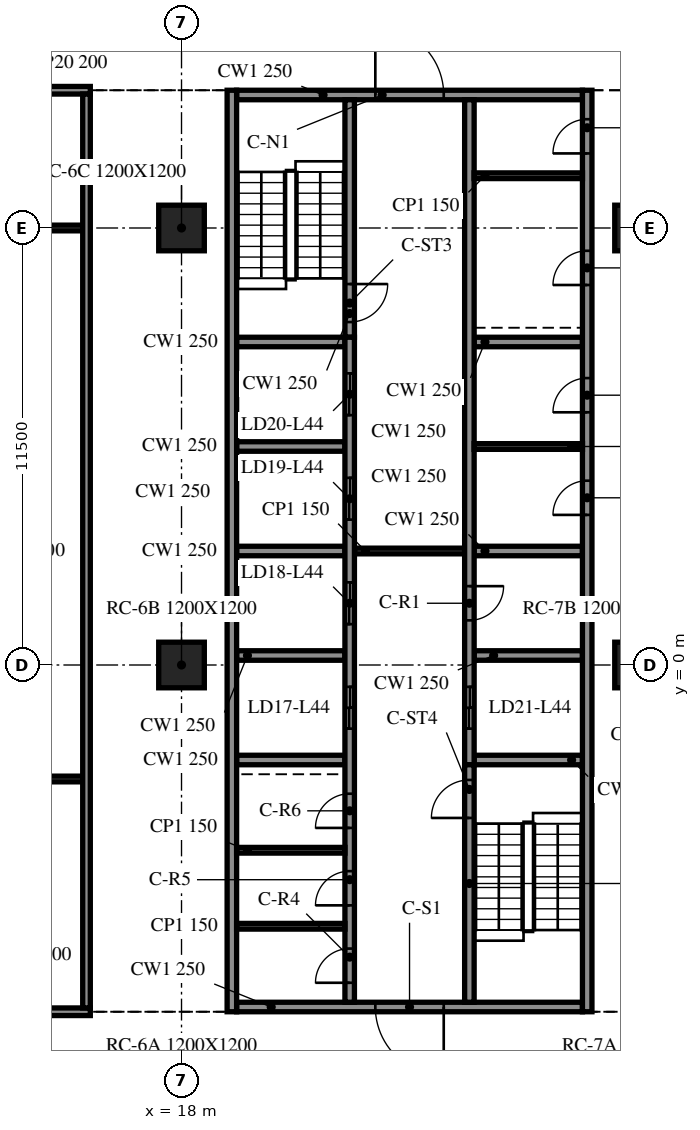
"""IFC4 building model, lengths in metres.
Left out: names, types, materials, properties, quantities, classifications, styles, units other than length and angle.
Written with IfcOpenShell. Run it as: python <this file> out.ifc"""

import sys

from ifc_helpers import new_model, si_unit, direction, frame, frame_2d, origin, origin_2d, place, context, subcontext, project, spatial, rectangle, extrude, element, fill, save


model = new_model("IFC4")
c1 = context("Model", 3, precision=1e-05, world=origin(), true_north=direction((0.0, 1.0)))
c2 = subcontext(c1, "Body", "Model", "MODEL_VIEW")
j1 = project(units=[si_unit("LENGTHUNIT", "METRE"), si_unit("PLANEANGLEUNIT", "RADIAN")], contexts=[c1])
p1 = place(None, origin())
s1 = spatial("IfcSite", under=j1, at=p1, CompositionType="ELEMENT")
p2 = place(p1, origin())
s2 = spatial("IfcBuilding", under=s1, at=p2, CompositionType="ELEMENT")
p3 = place(p2, frame((0.0, 0.0, 185.8)))
s3 = spatial("IfcBuildingStorey", under=s2, at=p3, CompositionType="ELEMENT", Elevation=185.8)
for number, where, z_axis, x_axis in (
    (1, (18.0, 0.0, -0.34), (0.0, 0.0, 1.0), (1.0, 0.0, 0.0)),
    (2, (18.0, 11.5, -0.34), (0.0, 0.0, 1.0), (1.0, 0.0, 0.0)),
    (3, (30.0, 0.0, -0.34), (0.0, 0.0, 1.0), (1.0, 0.0, 0.0)),
    (4, (30.0, 11.5, -0.34), (0.0, 0.0, 1.0), (1.0, 0.0, 0.0)),
):
    element("IfcColumn", number, at=place(p3, frame(where, z_axis=z_axis, x_axis=x_axis)), inside=s3, PredefinedType="COLUMN", context=c2, shape_type="SweptSolid", body=[
        extrude(rectangle(XDim=1.2, YDim=1.2, at=origin_2d()), origin(), (0.0, 0.0, 1.0), 3.74),
    ])
p4 = place(p3, frame((19.325, 15.125, 0.0), z_axis=(0.0, 0.0, 1.0), x_axis=(0.0, -1.0, 0.0)))
e5 = element("IfcWall", 5, at=p4, inside=s3, PredefinedType="SOLIDWALL", context=c2, shape_type="SweptSolid", body=[
    extrude(rectangle(XDim=24.25, YDim=0.25, at=frame_2d((12.125, 0.0))), origin(), (0.0, 0.0, 1.0), 3.4),
])
p5 = place(p3, frame((28.675, -9.125, 0.0), z_axis=(0.0, 0.0, 1.0), x_axis=(0.0, 1.0, 0.0)))
e6 = element("IfcWall", 6, at=p5, inside=s3, PredefinedType="SOLIDWALL", context=c2, shape_type="SweptSolid", body=[
    extrude(rectangle(XDim=24.25, YDim=0.25, at=frame_2d((12.125, 0.0))), origin(), (0.0, 0.0, 1.0), 3.4),
])
p6 = place(p5, frame((13.075, 0.0, 0.0)))
e7 = element("IfcOpeningElement", 7, at=p6, cuts=e6, PredefinedType="OPENING", context=c2, shape_type="SweptSolid", body=[
    extrude(rectangle(XDim=0.9, YDim=2.1, at=frame_2d((0.45, 1.05))), frame((0.0, 0.135, 0.0), z_axis=(0.0, -1.0, 0.0), x_axis=(1.0, 0.0, 0.0)), (0.0, 0.0, 1.0), 0.27),
])
p7 = place(p5, frame((15.775, 0.0, 0.0)))
e8 = element("IfcOpeningElement", 8, at=p7, cuts=e6, PredefinedType="OPENING", context=c2, shape_type="SweptSolid", body=[
    extrude(rectangle(XDim=0.9, YDim=2.1, at=frame_2d((0.45, 1.05))), frame((0.0, 0.135, 0.0), z_axis=(0.0, -1.0, 0.0), x_axis=(1.0, 0.0, 0.0)), (0.0, 0.0, 1.0), 0.27),
])
p8 = place(p5, frame((19.125, 0.0, 0.0)))
e9 = element("IfcOpeningElement", 9, at=p8, cuts=e6, PredefinedType="OPENING", context=c2, shape_type="SweptSolid", body=[
    extrude(rectangle(XDim=0.9, YDim=2.1, at=frame_2d((0.45, 1.05))), frame((0.0, 0.135, 0.0), z_axis=(0.0, -1.0, 0.0), x_axis=(1.0, 0.0, 0.0)), (0.0, 0.0, 1.0), 0.27),
])
p9 = place(p5, frame((22.587, 0.0, 0.0)))
e10 = element("IfcOpeningElement", 10, at=p9, cuts=e6, PredefinedType="OPENING", context=c2, shape_type="SweptSolid", body=[
    extrude(rectangle(XDim=0.9, YDim=2.1, at=frame_2d((0.45, 1.05))), frame((0.0, 0.135, 0.0), z_axis=(0.0, -1.0, 0.0), x_axis=(1.0, 0.0, 0.0)), (0.0, 0.0, 1.0), 0.27),
])
p10 = place(p3, frame((28.55, -9.0, 0.0), z_axis=(0.0, 0.0, 1.0), x_axis=(-1.0, 0.0, 0.0)))
e11 = element("IfcWall", 11, at=p10, inside=s3, PredefinedType="SOLIDWALL", context=c2, shape_type="SweptSolid", body=[
    extrude(rectangle(XDim=9.1, YDim=0.25, at=frame_2d((4.55, 0.0))), origin(), (0.0, 0.0, 1.0), 3.4),
])
p11 = place(p10, frame((3.65, 0.0, 0.0)))
e12 = element("IfcOpeningElement", 12, at=p11, cuts=e11, PredefinedType="OPENING", context=c2, shape_type="SweptSolid", body=[
    extrude(rectangle(XDim=1.8, YDim=2.1, at=frame_2d((0.9, 1.05))), frame((0.0, 0.135, 0.0), z_axis=(0.0, -1.0, 0.0), x_axis=(1.0, 0.0, 0.0)), (0.0, 0.0, 1.0), 0.27),
])
p12 = place(p3, frame((19.45, 15.0, 0.0), z_axis=(0.0, 0.0, 1.0), x_axis=(1.0, 0.0, 0.0)))
e13 = element("IfcWall", 13, at=p12, inside=s3, PredefinedType="SOLIDWALL", context=c2, shape_type="SweptSolid", body=[
    extrude(rectangle(XDim=9.1, YDim=0.25, at=frame_2d((4.55, 0.0))), origin(), (0.0, 0.0, 1.0), 3.4),
])
p13 = place(p12, frame((3.65, 0.0, 0.0)))
e14 = element("IfcOpeningElement", 14, at=p13, cuts=e13, PredefinedType="OPENING", context=c2, shape_type="SweptSolid", body=[
    extrude(rectangle(XDim=1.8, YDim=2.1, at=frame_2d((0.9, 1.05))), frame((0.0, 0.135, 0.0), z_axis=(0.0, -1.0, 0.0), x_axis=(1.0, 0.0, 0.0)), (0.0, 0.0, 1.0), 0.27),
])
p14 = place(p3, frame((22.425, -8.875, 0.0), z_axis=(0.0, 0.0, 1.0), x_axis=(0.0, 1.0, 0.0)))
e15 = element("IfcWall", 15, at=p14, inside=s3, PredefinedType="SOLIDWALL", context=c2, shape_type="SweptSolid", body=[
    extrude(rectangle(XDim=17.5, YDim=0.25, at=frame_2d((8.75, 0.0))), origin(), (0.0, 0.0, 1.0), 3.4),
])
p15 = place(p14, frame((7.2, 0.0, 0.0)))
e16 = element("IfcOpeningElement", 16, at=p15, cuts=e15, PredefinedType="OPENING", context=c2, shape_type="SweptSolid", body=[
    extrude(rectangle(XDim=1.1, YDim=2.1, at=frame_2d((0.55, 1.05))), frame((0.0, 0.135, 0.0), z_axis=(0.0, -1.0, 0.0), x_axis=(1.0, 0.0, 0.0)), (0.0, 0.0, 1.0), 0.27),
])
p16 = place(p14, frame((9.95, 0.0, 0.0)))
e17 = element("IfcOpeningElement", 17, at=p16, cuts=e15, PredefinedType="OPENING", context=c2, shape_type="SweptSolid", body=[
    extrude(rectangle(XDim=1.1, YDim=2.1, at=frame_2d((0.55, 1.05))), frame((0.0, 0.135, 0.0), z_axis=(0.0, -1.0, 0.0), x_axis=(1.0, 0.0, 0.0)), (0.0, 0.0, 1.0), 0.27),
])
p17 = place(p14, frame((12.7, 0.0, 0.0)))
e18 = element("IfcOpeningElement", 18, at=p17, cuts=e15, PredefinedType="OPENING", context=c2, shape_type="SweptSolid", body=[
    extrude(rectangle(XDim=1.1, YDim=2.1, at=frame_2d((0.55, 1.05))), frame((0.0, 0.135, 0.0), z_axis=(0.0, -1.0, 0.0), x_axis=(1.0, 0.0, 0.0)), (0.0, 0.0, 1.0), 0.27),
])
p18 = place(p14, frame((15.45, 0.0, 0.0)))
e19 = element("IfcOpeningElement", 19, at=p18, cuts=e15, PredefinedType="OPENING", context=c2, shape_type="SweptSolid", body=[
    extrude(rectangle(XDim=1.1, YDim=2.1, at=frame_2d((0.55, 1.05))), frame((0.0, 0.135, 0.0), z_axis=(0.0, -1.0, 0.0), x_axis=(1.0, 0.0, 0.0)), (0.0, 0.0, 1.0), 0.27),
])
p19 = place(p14, frame((0.512, 0.0, 0.0)))
e20 = element("IfcOpeningElement", 20, at=p19, cuts=e15, PredefinedType="OPENING", context=c2, shape_type="SweptSolid", body=[
    extrude(rectangle(XDim=0.9, YDim=2.1, at=frame_2d((0.45, 1.05))), frame((0.0, 0.135, 0.0), z_axis=(0.0, -1.0, 0.0), x_axis=(1.0, 0.0, 0.0)), (0.0, 0.0, 1.0), 0.27),
])
p20 = place(p14, frame((2.55, 0.0, 0.0)))
e21 = element("IfcOpeningElement", 21, at=p20, cuts=e15, PredefinedType="OPENING", context=c2, shape_type="SweptSolid", body=[
    extrude(rectangle(XDim=0.9, YDim=2.1, at=frame_2d((0.45, 1.05))), frame((0.0, 0.135, 0.0), z_axis=(0.0, -1.0, 0.0), x_axis=(1.0, 0.0, 0.0)), (0.0, 0.0, 1.0), 0.27),
])
p21 = place(p14, frame((4.587, 0.0, 0.0)))
e22 = element("IfcOpeningElement", 22, at=p21, cuts=e15, PredefinedType="OPENING", context=c2, shape_type="SweptSolid", body=[
    extrude(rectangle(XDim=0.9, YDim=2.1, at=frame_2d((0.45, 1.05))), frame((0.0, 0.135, 0.0), z_axis=(0.0, -1.0, 0.0), x_axis=(1.0, 0.0, 0.0)), (0.0, 0.0, 1.0), 0.27),
])
p22 = place(p3, frame((22.425, 14.875, 0.0), z_axis=(0.0, 0.0, 1.0), x_axis=(0.0, -1.0, 0.0)))
e23 = element("IfcWall", 23, at=p22, inside=s3, PredefinedType="SOLIDWALL", context=c2, shape_type="SweptSolid", body=[
    extrude(rectangle(XDim=6.25, YDim=0.25, at=frame_2d((3.125, 0.0))), origin(), (0.0, 0.0, 1.0), 3.4),
])
p23 = place(p22, frame((4.85, 0.0, 0.0)))
e24 = element("IfcOpeningElement", 24, at=p23, cuts=e23, PredefinedType="OPENING", context=c2, shape_type="SweptSolid", body=[
    extrude(rectangle(XDim=1.0, YDim=2.1, at=frame_2d((0.5, 1.05))), frame((0.0, 0.135, 0.0), z_axis=(0.0, -1.0, 0.0), x_axis=(1.0, 0.0, 0.0)), (0.0, 0.0, 1.0), 0.27),
])
p24 = place(p3, frame((25.575, -8.875, 0.0), z_axis=(0.0, 0.0, 1.0), x_axis=(0.0, 1.0, 0.0)))
e25 = element("IfcWall", 25, at=p24, inside=s3, PredefinedType="SOLIDWALL", context=c2, shape_type="SweptSolid", body=[
    extrude(rectangle(XDim=6.25, YDim=0.25, at=frame_2d((3.125, 0.0))), origin(), (0.0, 0.0, 1.0), 3.4),
])
p25 = place(p24, frame((4.85, 0.0, 0.0)))
e26 = element("IfcOpeningElement", 26, at=p25, cuts=e25, PredefinedType="OPENING", context=c2, shape_type="SweptSolid", body=[
    extrude(rectangle(XDim=1.0, YDim=2.1, at=frame_2d((0.5, 1.05))), frame((0.0, 0.135, 0.0), z_axis=(0.0, -1.0, 0.0), x_axis=(1.0, 0.0, 0.0)), (0.0, 0.0, 1.0), 0.27),
])
p26 = place(p3, frame((25.575, 14.875, 0.0), z_axis=(0.0, 0.0, 1.0), x_axis=(0.0, -1.0, 0.0)))
e27 = element("IfcWall", 27, at=p26, inside=s3, PredefinedType="SOLIDWALL", context=c2, shape_type="SweptSolid", body=[
    extrude(rectangle(XDim=17.5, YDim=0.25, at=frame_2d((8.75, 0.0))), origin(), (0.0, 0.0, 1.0), 3.4),
])
p27 = place(p26, frame((15.45, 0.0, 0.0)))
e28 = element("IfcOpeningElement", 28, at=p27, cuts=e27, PredefinedType="OPENING", context=c2, shape_type="SweptSolid", body=[
    extrude(rectangle(XDim=1.1, YDim=2.1, at=frame_2d((0.55, 1.05))), frame((0.0, 0.135, 0.0), z_axis=(0.0, -1.0, 0.0), x_axis=(1.0, 0.0, 0.0)), (0.0, 0.0, 1.0), 0.27),
])
p28 = place(p26, frame((12.8, 0.0, 0.0)))
e29 = element("IfcOpeningElement", 29, at=p28, cuts=e27, PredefinedType="OPENING", context=c2, shape_type="SweptSolid", body=[
    extrude(rectangle(XDim=0.9, YDim=2.1, at=frame_2d((0.45, 1.05))), frame((0.0, 0.135, 0.0), z_axis=(0.0, -1.0, 0.0), x_axis=(1.0, 0.0, 0.0)), (0.0, 0.0, 1.0), 0.27),
])
for number, where, z_axis, x_axis in (
    (30, (19.45, -2.5, 0.0), (0.0, 0.0, 1.0), (1.0, 0.0, 0.0)),
    (31, (19.45, 0.25, 0.0), (0.0, 0.0, 1.0), (1.0, 0.0, 0.0)),
    (32, (19.45, 3.0, 0.0), (0.0, 0.0, 1.0), (1.0, 0.0, 0.0)),
    (33, (19.45, 5.75, 0.0), (0.0, 0.0, 1.0), (1.0, 0.0, 0.0)),
    (34, (19.45, 8.5, 0.0), (0.0, 0.0, 1.0), (1.0, 0.0, 0.0)),
    (35, (25.7, -2.5, 0.0), (0.0, 0.0, 1.0), (1.0, 0.0, 0.0)),
    (36, (25.7, 0.25, 0.0), (0.0, 0.0, 1.0), (1.0, 0.0, 0.0)),
    (37, (25.7, 3.0, 0.0), (0.0, 0.0, 1.0), (1.0, 0.0, 0.0)),
    (38, (25.7, 8.5, 0.0), (0.0, 0.0, 1.0), (1.0, 0.0, 0.0)),
):
    element("IfcWall", number, at=place(p3, frame(where, z_axis=z_axis, x_axis=x_axis)), inside=s3, PredefinedType="SOLIDWALL", context=c2, shape_type="SweptSolid", body=[
        extrude(rectangle(XDim=2.85, YDim=0.25, at=frame_2d((1.425, 0.0))), origin(), (0.0, 0.0, 1.0), 3.4),
    ])
p29 = place(p3, frame((22.55, 3.0, 0.0), z_axis=(0.0, 0.0, 1.0), x_axis=(1.0, 0.0, 0.0)))
e39 = element("IfcWall", 39, at=p29, inside=s3, PredefinedType="PARTITIONING", context=c2, shape_type="SweptSolid", body=[
    extrude(rectangle(XDim=2.9, YDim=0.15, at=frame_2d((1.45, 0.0))), origin(), (0.0, 0.0, 1.0), 3.4),
])
for number, where, z_axis, x_axis in (
    (40, (25.7, 5.75, 0.0), (0.0, 0.0, 1.0), (1.0, 0.0, 0.0)),
    (41, (19.45, -6.875, 0.0), (0.0, 0.0, 1.0), (1.0, 0.0, 0.0)),
    (42, (19.45, -4.875, 0.0), (0.0, 0.0, 1.0), (1.0, 0.0, 0.0)),
    (43, (25.7, 12.875, 0.0), (0.0, 0.0, 1.0), (1.0, 0.0, 0.0)),
):
    element("IfcWall", number, at=place(p3, frame(where, z_axis=z_axis, x_axis=x_axis)), inside=s3, PredefinedType="PARTITIONING", context=c2, shape_type="SweptSolid", body=[
        extrude(rectangle(XDim=2.85, YDim=0.15, at=frame_2d((1.425, 0.0))), origin(), (0.0, 0.0, 1.0), 3.4),
    ])
p30 = place(p3, frame((8.3, -9.125, 0.0), z_axis=(0.0, 0.0, 1.0), x_axis=(1.0, 0.0, 0.0)))
e44 = element("IfcWall", 44, at=p30, inside=s3, PredefinedType="PARTITIONING", context=c2, shape_type="SweptSolid", body=[
    extrude(rectangle(XDim=7.3, YDim=0.2, at=frame_2d((3.65, 0.0))), origin(), (0.0, 0.0, 1.0), 3.4),
])
p31 = place(p30, frame((3.1, 0.0, 0.0)))
e45 = element("IfcOpeningElement", 45, at=p31, cuts=e44, PredefinedType="OPENING", context=c2, shape_type="SweptSolid", body=[
    extrude(rectangle(XDim=0.9, YDim=2.1, at=frame_2d((0.45, 1.05))), frame((0.0, 0.11, 0.0), z_axis=(0.0, -1.0, 0.0), x_axis=(1.0, 0.0, 0.0)), (0.0, 0.0, 1.0), 0.22),
])
for number, where, z_axis, x_axis in (
    (46, (8.5, -3.0, 0.0), (0.0, 0.0, 1.0), (1.0, 0.0, 0.0)),
    (47, (8.5, 11.5, 0.0), (0.0, 0.0, 1.0), (1.0, 0.0, 0.0)),
):
    element("IfcWall", number, at=place(p3, frame(where, z_axis=z_axis, x_axis=x_axis)), inside=s3, PredefinedType="PARTITIONING", context=c2, shape_type="SweptSolid", body=[
        extrude(rectangle(XDim=6.9, YDim=0.15, at=frame_2d((3.45, 0.0))), origin(), (0.0, 0.0, 1.0), 3.4),
    ])
p32 = place(p3, frame((8.3, 15.125, 0.0), z_axis=(0.0, 0.0, 1.0), x_axis=(1.0, 0.0, 0.0)))
e48 = element("IfcWall", 48, at=p32, inside=s3, PredefinedType="PARTITIONING", context=c2, shape_type="SweptSolid", body=[
    extrude(rectangle(XDim=7.3, YDim=0.2, at=frame_2d((3.65, 0.0))), origin(), (0.0, 0.0, 1.0), 3.4),
])
p33 = place(p32, frame((3.1, 0.0, 0.0)))
e49 = element("IfcOpeningElement", 49, at=p33, cuts=e48, PredefinedType="OPENING", context=c2, shape_type="SweptSolid", body=[
    extrude(rectangle(XDim=0.9, YDim=2.1, at=frame_2d((0.45, 1.05))), frame((0.0, 0.11, 0.0), z_axis=(0.0, -1.0, 0.0), x_axis=(1.0, 0.0, 0.0)), (0.0, 0.0, 1.0), 0.22),
])
p34 = place(p3, frame((15.5, -9.025, 0.0), z_axis=(0.0, 0.0, 1.0), x_axis=(0.0, 1.0, 0.0)))
e50 = element("IfcWall", 50, at=p34, inside=s3, PredefinedType="PARTITIONING", context=c2, shape_type="SweptSolid", body=[
    extrude(rectangle(XDim=24.05, YDim=0.2, at=frame_2d((12.025, 0.0))), origin(), (0.0, 0.0, 1.0), 3.4),
])
p35 = place(p11, origin())
e51 = element("IfcDoor", 51, at=p35, inside=s3, OperationType="DOUBLE_DOOR_SINGLE_SWING", PredefinedType="DOOR", context=c2, shape_type="SweptSolid", body=[
    extrude(rectangle(XDim=1.8, YDim=2.1, at=frame_2d((0.9, 1.05))), frame((0.0, 0.025, 0.0), z_axis=(0.0, -1.0, 0.0), x_axis=(1.0, 0.0, 0.0)), (0.0, 0.0, 1.0), 0.05),
])
fill(e12, e51)
p36 = place(p13, origin())
e52 = element("IfcDoor", 52, at=p36, inside=s3, OperationType="DOUBLE_DOOR_SINGLE_SWING", PredefinedType="DOOR", context=c2, shape_type="SweptSolid", body=[
    extrude(rectangle(XDim=1.8, YDim=2.1, at=frame_2d((0.9, 1.05))), frame((0.0, 0.025, 0.0), z_axis=(0.0, -1.0, 0.0), x_axis=(1.0, 0.0, 0.0)), (0.0, 0.0, 1.0), 0.05),
])
fill(e14, e52)
p37 = place(p27, origin())
e53 = element("IfcDoor", 53, at=p37, inside=s3, OperationType="DOUBLE_DOOR_SLIDING", PredefinedType="DOOR", context=c2, shape_type="SweptSolid", body=[
    extrude(rectangle(XDim=1.1, YDim=2.1, at=frame_2d((0.55, 1.05))), frame((0.0, 0.025, 0.0), z_axis=(0.0, -1.0, 0.0), x_axis=(1.0, 0.0, 0.0)), (0.0, 0.0, 1.0), 0.05),
])
fill(e28, e53)
p38 = place(p15, origin())
e54 = element("IfcDoor", 54, at=p38, inside=s3, OperationType="DOUBLE_DOOR_SLIDING", PredefinedType="DOOR", context=c2, shape_type="SweptSolid", body=[
    extrude(rectangle(XDim=1.1, YDim=2.1, at=frame_2d((0.55, 1.05))), frame((0.0, 0.025, 0.0), z_axis=(0.0, -1.0, 0.0), x_axis=(1.0, 0.0, 0.0)), (0.0, 0.0, 1.0), 0.05),
])
fill(e16, e54)
p39 = place(p16, origin())
e55 = element("IfcDoor", 55, at=p39, inside=s3, OperationType="DOUBLE_DOOR_SLIDING", PredefinedType="DOOR", context=c2, shape_type="SweptSolid", body=[
    extrude(rectangle(XDim=1.1, YDim=2.1, at=frame_2d((0.55, 1.05))), frame((0.0, 0.025, 0.0), z_axis=(0.0, -1.0, 0.0), x_axis=(1.0, 0.0, 0.0)), (0.0, 0.0, 1.0), 0.05),
])
fill(e17, e55)
p40 = place(p17, origin())
e56 = element("IfcDoor", 56, at=p40, inside=s3, OperationType="DOUBLE_DOOR_SLIDING", PredefinedType="DOOR", context=c2, shape_type="SweptSolid", body=[
    extrude(rectangle(XDim=1.1, YDim=2.1, at=frame_2d((0.55, 1.05))), frame((0.0, 0.025, 0.0), z_axis=(0.0, -1.0, 0.0), x_axis=(1.0, 0.0, 0.0)), (0.0, 0.0, 1.0), 0.05),
])
fill(e18, e56)
p41 = place(p18, origin())
e57 = element("IfcDoor", 57, at=p41, inside=s3, OperationType="DOUBLE_DOOR_SLIDING", PredefinedType="DOOR", context=c2, shape_type="SweptSolid", body=[
    extrude(rectangle(XDim=1.1, YDim=2.1, at=frame_2d((0.55, 1.05))), frame((0.0, 0.025, 0.0), z_axis=(0.0, -1.0, 0.0), x_axis=(1.0, 0.0, 0.0)), (0.0, 0.0, 1.0), 0.05),
])
fill(e19, e57)
p42 = place(p28, origin())
e58 = element("IfcDoor", 58, at=p42, inside=s3, OperationType="SINGLE_SWING_LEFT", PredefinedType="DOOR", context=c2, shape_type="SweptSolid", body=[
    extrude(rectangle(XDim=0.9, YDim=2.1, at=frame_2d((0.45, 1.05))), frame((0.0, 0.025, 0.0), z_axis=(0.0, -1.0, 0.0), x_axis=(1.0, 0.0, 0.0)), (0.0, 0.0, 1.0), 0.05),
])
fill(e29, e58)
p43 = place(p6, origin())
e59 = element("IfcDoor", 59, at=p43, inside=s3, OperationType="SINGLE_SWING_RIGHT", PredefinedType="DOOR", context=c2, shape_type="SweptSolid", body=[
    extrude(rectangle(XDim=0.9, YDim=2.1, at=frame_2d((0.45, 1.05))), frame((0.0, 0.025, 0.0), z_axis=(0.0, -1.0, 0.0), x_axis=(1.0, 0.0, 0.0)), (0.0, 0.0, 1.0), 0.05),
])
fill(e7, e59)
p44 = place(p7, origin())
e60 = element("IfcDoor", 60, at=p44, inside=s3, OperationType="SINGLE_SWING_LEFT", PredefinedType="DOOR", context=c2, shape_type="SweptSolid", body=[
    extrude(rectangle(XDim=0.9, YDim=2.1, at=frame_2d((0.45, 1.05))), frame((0.0, 0.025, 0.0), z_axis=(0.0, -1.0, 0.0), x_axis=(1.0, 0.0, 0.0)), (0.0, 0.0, 1.0), 0.05),
])
fill(e8, e60)
p45 = place(p19, origin())
e61 = element("IfcDoor", 61, at=p45, inside=s3, OperationType="SINGLE_SWING_RIGHT", PredefinedType="DOOR", context=c2, shape_type="SweptSolid", body=[
    extrude(rectangle(XDim=0.9, YDim=2.1, at=frame_2d((0.45, 1.05))), frame((0.0, 0.025, 0.0), z_axis=(0.0, -1.0, 0.0), x_axis=(1.0, 0.0, 0.0)), (0.0, 0.0, 1.0), 0.05),
])
fill(e20, e61)
p46 = place(p20, origin())
e62 = element("IfcDoor", 62, at=p46, inside=s3, OperationType="SINGLE_SWING_LEFT", PredefinedType="DOOR", context=c2, shape_type="SweptSolid", body=[
    extrude(rectangle(XDim=0.9, YDim=2.1, at=frame_2d((0.45, 1.05))), frame((0.0, 0.025, 0.0), z_axis=(0.0, -1.0, 0.0), x_axis=(1.0, 0.0, 0.0)), (0.0, 0.0, 1.0), 0.05),
])
fill(e21, e62)
p47 = place(p21, origin())
e63 = element("IfcDoor", 63, at=p47, inside=s3, OperationType="SINGLE_SWING_RIGHT", PredefinedType="DOOR", context=c2, shape_type="SweptSolid", body=[
    extrude(rectangle(XDim=0.9, YDim=2.1, at=frame_2d((0.45, 1.05))), frame((0.0, 0.025, 0.0), z_axis=(0.0, -1.0, 0.0), x_axis=(1.0, 0.0, 0.0)), (0.0, 0.0, 1.0), 0.05),
])
fill(e22, e63)
p48 = place(p8, origin())
e64 = element("IfcDoor", 64, at=p48, inside=s3, OperationType="SINGLE_SWING_LEFT", PredefinedType="DOOR", context=c2, shape_type="SweptSolid", body=[
    extrude(rectangle(XDim=0.9, YDim=2.1, at=frame_2d((0.45, 1.05))), frame((0.0, 0.025, 0.0), z_axis=(0.0, -1.0, 0.0), x_axis=(1.0, 0.0, 0.0)), (0.0, 0.0, 1.0), 0.05),
])
fill(e9, e64)
p49 = place(p9, origin())
e65 = element("IfcDoor", 65, at=p49, inside=s3, OperationType="SINGLE_SWING_RIGHT", PredefinedType="DOOR", context=c2, shape_type="SweptSolid", body=[
    extrude(rectangle(XDim=0.9, YDim=2.1, at=frame_2d((0.45, 1.05))), frame((0.0, 0.025, 0.0), z_axis=(0.0, -1.0, 0.0), x_axis=(1.0, 0.0, 0.0)), (0.0, 0.0, 1.0), 0.05),
])
fill(e10, e65)
p50 = place(p23, origin())
e66 = element("IfcDoor", 66, at=p50, inside=s3, OperationType="SINGLE_SWING_LEFT", PredefinedType="DOOR", context=c2, shape_type="SweptSolid", body=[
    extrude(rectangle(XDim=1.0, YDim=2.1, at=frame_2d((0.5, 1.05))), frame((0.0, 0.025, 0.0), z_axis=(0.0, -1.0, 0.0), x_axis=(1.0, 0.0, 0.0)), (0.0, 0.0, 1.0), 0.05),
])
fill(e24, e66)
p51 = place(p25, origin())
e67 = element("IfcDoor", 67, at=p51, inside=s3, OperationType="SINGLE_SWING_RIGHT", PredefinedType="DOOR", context=c2, shape_type="SweptSolid", body=[
    extrude(rectangle(XDim=1.0, YDim=2.1, at=frame_2d((0.5, 1.05))), frame((0.0, 0.025, 0.0), z_axis=(0.0, -1.0, 0.0), x_axis=(1.0, 0.0, 0.0)), (0.0, 0.0, 1.0), 0.05),
])
fill(e26, e67)
save(model, sys.argv[1])
